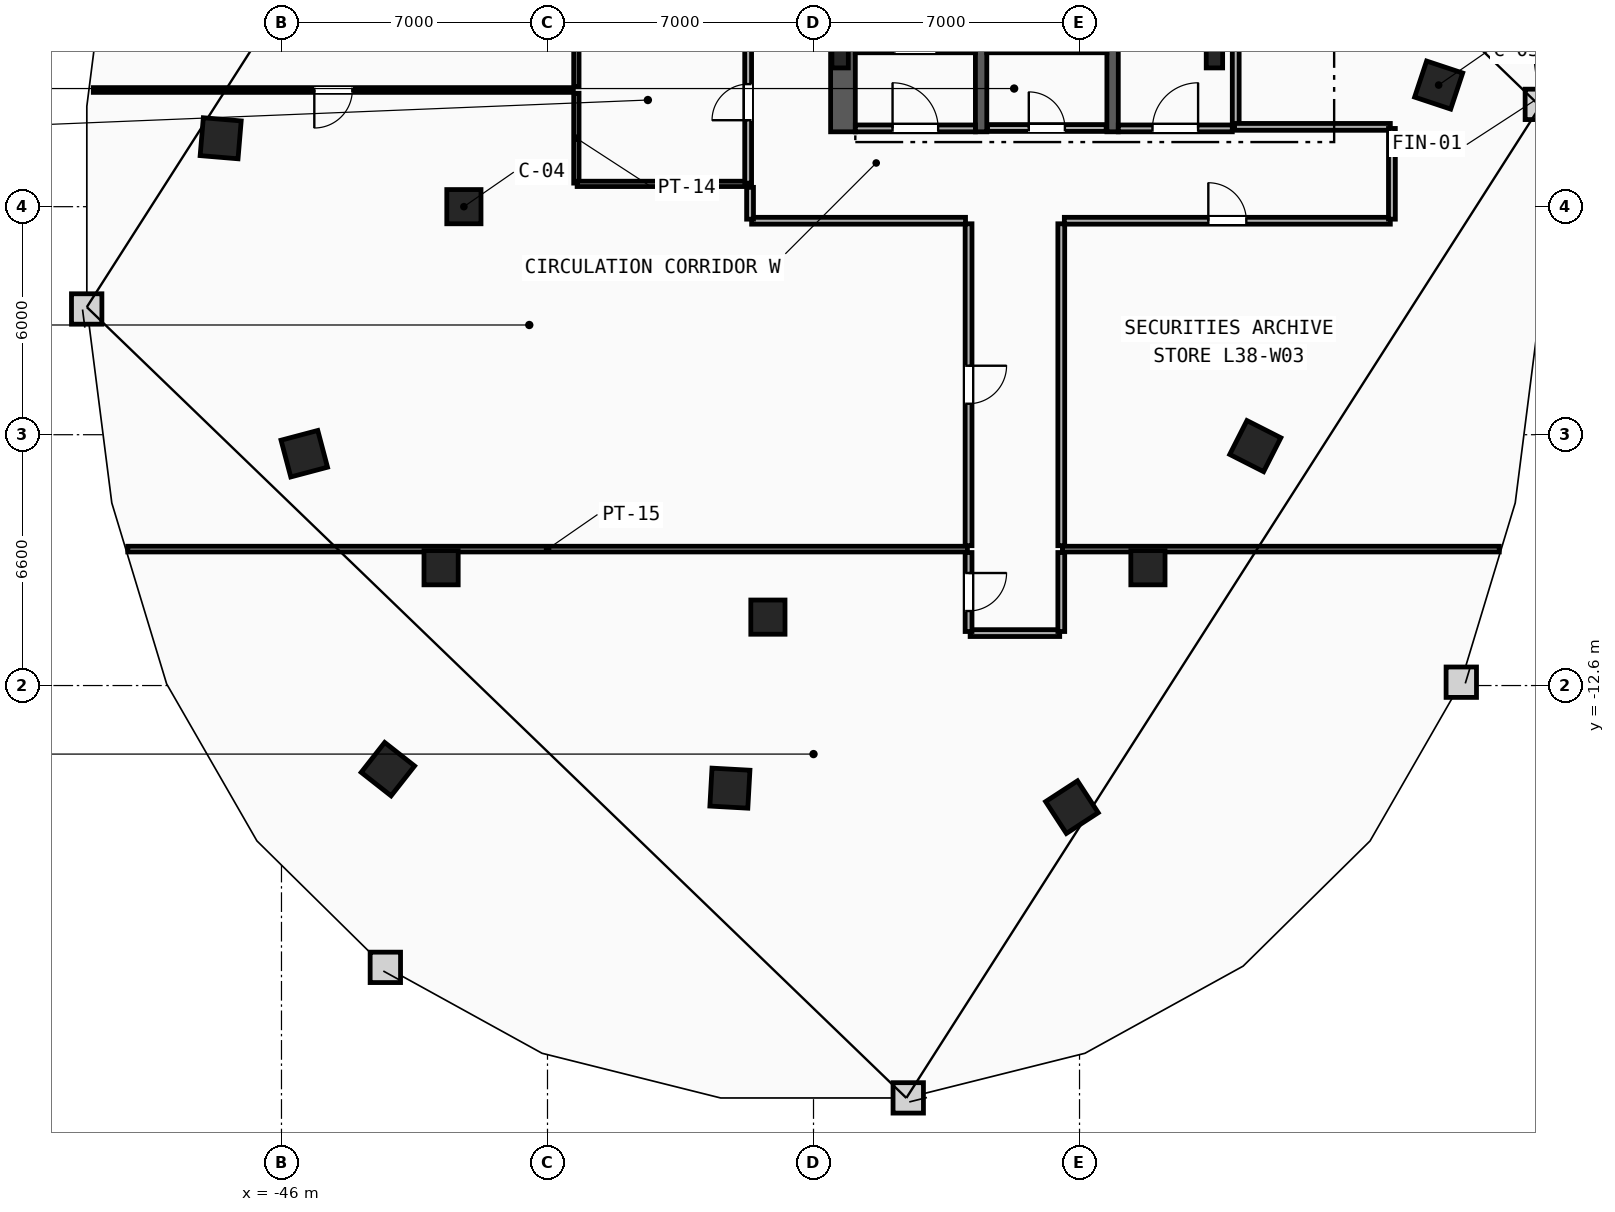
"""IFC4 building model, lengths in metres.
Left out: names, types, materials, properties, quantities, classifications, styles, units other than length and angle.
Written with IfcOpenShell. Run it as: python <this file> out.ifc"""

import sys

from ifc_helpers import new_model, si_unit, direction, frame, frame_2d, origin, origin_2d, place, context, subcontext, project, spatial, rectangle, i_section, extrude, element, fill, save


model = new_model("IFC4")
c1 = context("Model", 3, precision=1e-05, world=origin(), true_north=direction((0.0, 1.0)))
c2 = subcontext(c1, "Body", "Model", "MODEL_VIEW")
j1 = project(units=[si_unit("LENGTHUNIT", "METRE"), si_unit("PLANEANGLEUNIT", "RADIAN")], contexts=[c1])
p1 = place(None, origin())
s1 = spatial("IfcSite", under=j1, at=p1, CompositionType="ELEMENT")
p2 = place(p1, origin())
s2 = spatial("IfcBuilding", under=s1, at=p2, CompositionType="ELEMENT")
p3 = place(p2, frame((0.0, 0.0, 147.6)))
s3 = spatial("IfcBuildingStorey", under=s2, at=p3, CompositionType="ELEMENT", Elevation=147.6)
for number, where, z_axis, x_axis in (
    (1, (-31.3, 3.9, 0.0), (0.0, 0.0, 1.0), (1.0, 0.0, 0.0)),
    (2, (-21.45, 3.9, 0.0), (0.0, 0.0, 1.0), (1.0, 0.0, 0.0)),
):
    element("IfcColumn", number, at=place(p3, frame(where, z_axis=z_axis, x_axis=x_axis)), inside=s3, PredefinedType="COLUMN", context=c2, shape_type="SweptSolid", body=[
        extrude(i_section(OverallWidth=0.432, OverallDepth=0.498, WebThickness=0.056, FlangeThickness=0.089, FilletRadius=0.018, at=origin_2d()), origin(), (0.0, 0.0, 1.0), 3.6),
    ])
for number, where, z_axis, x_axis in (
    (3, (-41.2, 0.0, 0.0), (0.0, 0.0, 1.0), (1.0, 0.0, 0.0)),
    (4, (-41.8, -9.5, 0.0), (0.0, 0.0, 1.0), (1.0, 0.0, 0.0)),
    (5, (-33.2, -10.8, 0.0), (0.0, 0.0, 1.0), (1.0, 0.0, 0.0)),
    (6, (-23.2, -9.5, 0.0), (0.0, 0.0, 1.0), (1.0, 0.0, 0.0)),
):
    element("IfcColumn", number, at=place(p3, frame(where, z_axis=z_axis, x_axis=x_axis)), inside=s3, PredefinedType="COLUMN", context=c2, shape_type="SweptSolid", body=[
        extrude(rectangle(XDim=0.9, YDim=0.9, at=origin_2d()), origin(), (0.0, 0.0, 1.0), 3.6),
    ])
for number, where, z_axis, x_axis in (
    (7, (-15.55, 3.2, 0.0), (0.0, 0.0, 1.0), (0.315, 0.949, 0.0)),
    (8, (-47.6, 1.8, 0.0), (0.0, 0.0, 1.0), (-0.084, -0.997, 0.0)),
    (9, (-45.4, -6.5, 0.0), (0.0, 0.0, 1.0), (0.256, -0.967, 0.0)),
    (10, (-43.2, -14.8, 0.0), (0.0, 0.0, 1.0), (0.786, -0.618, 0.0)),
    (11, (-34.2, -15.3, 0.0), (0.0, 0.0, 1.0), (0.998, -0.055, 0.0)),
    (12, (-25.2, -15.8, 0.0), (0.0, 0.0, 1.0), (0.838, 0.546, 0.0)),
    (13, (-20.375, -6.3, 0.0), (0.0, 0.0, 1.0), (0.453, 0.892, 0.0)),
):
    element("IfcColumn", number, at=place(p3, frame(where, z_axis=z_axis, x_axis=x_axis)), inside=s3, PredefinedType="COLUMN", context=c2, shape_type="SweptSolid", body=[
        extrude(rectangle(XDim=1.0, YDim=1.0, at=origin_2d()), origin(), (0.0, 0.0, 1.0), 3.6),
    ])
p4 = place(p3, frame((-31.225, 1.97, 0.0), z_axis=(0.0, 0.0, 1.0), x_axis=(0.0, 1.0, 0.0)))
e14 = element("IfcWall", 14, at=p4, inside=s3, PredefinedType="SHEAR", context=c2, shape_type="SweptSolid", body=[
    extrude(rectangle(XDim=13.33, YDim=0.65, at=frame_2d((6.665, 0.0))), origin(), (0.0, 0.0, 1.0), 3.36),
])
for number, where, z_axis, x_axis in (
    (15, (-27.59, 1.97, 0.0), (0.0, 0.0, 1.0), (0.0, 1.0, 0.0)),
    (16, (-24.13, 1.97, 0.0), (0.0, 0.0, 1.0), (0.0, 1.0, 0.0)),
):
    element("IfcWall", number, at=place(p3, frame(where, z_axis=z_axis, x_axis=x_axis)), inside=s3, PredefinedType="SHEAR", context=c2, shape_type="SweptSolid", body=[
        extrude(rectangle(XDim=10.68, YDim=0.3, at=frame_2d((5.34, 0.0))), origin(), (0.0, 0.0, 1.0), 3.36),
    ])
p5 = place(p3, frame((-30.9, 4.2, 0.0), z_axis=(0.0, 0.0, 1.0), x_axis=(1.0, 0.0, 0.0)))
e17 = element("IfcWall", 17, at=p5, inside=s3, PredefinedType="SHEAR", context=c2, shape_type="SweptSolid", body=[
    extrude(rectangle(XDim=3.16, YDim=0.3, at=frame_2d((1.58, 0.0))), origin(), (0.0, 0.0, 1.0), 3.36),
])
p6 = place(p5, frame((1.03, 0.0, 0.0)))
e18 = element("IfcOpeningElement", 18, at=p6, cuts=e17, PredefinedType="OPENING", context=c2, shape_type="SweptSolid", body=[
    extrude(rectangle(XDim=1.1, YDim=2.15, at=frame_2d((0.55, 1.075))), frame((0.0, 0.16, 0.0), z_axis=(0.0, -1.0, 0.0), x_axis=(1.0, 0.0, 0.0)), (0.0, 0.0, 1.0), 0.32),
])
p7 = place(p3, frame((-27.44, 4.2, 0.0), z_axis=(0.0, 0.0, 1.0), x_axis=(1.0, 0.0, 0.0)))
e19 = element("IfcWall", 19, at=p7, inside=s3, PredefinedType="SHEAR", context=c2, shape_type="SweptSolid", body=[
    extrude(rectangle(XDim=3.16, YDim=0.3, at=frame_2d((1.58, 0.0))), origin(), (0.0, 0.0, 1.0), 3.36),
])
p8 = place(p3, frame((-20.89, 2.15, 0.0), z_axis=(0.0, 0.0, 1.0), x_axis=(0.0, 1.0, 0.0)))
e20 = element("IfcWall", 20, at=p8, inside=s3, PredefinedType="PARTITIONING", context=c2, shape_type="SweptSolid", body=[
    extrude(rectangle(XDim=5.3, YDim=0.18, at=frame_2d((2.65, 0.0))), origin(), (0.0, 0.0, 1.0), 3.36),
])
p9 = place(p3, frame((-23.98, 2.06, 0.0), z_axis=(0.0, 0.0, 1.0), x_axis=(1.0, 0.0, 0.0)))
e21 = element("IfcWall", 21, at=p9, inside=s3, PredefinedType="PARTITIONING", context=c2, shape_type="SweptSolid", body=[
    extrude(rectangle(XDim=3.0, YDim=0.18, at=frame_2d((1.5, 0.0))), origin(), (0.0, 0.0, 1.0), 3.36),
])
p10 = place(p9, frame((0.9, 0.0, 0.0)))
e22 = element("IfcOpeningElement", 22, at=p10, cuts=e21, PredefinedType="OPENING", context=c2, shape_type="SweptSolid", body=[
    extrude(rectangle(XDim=1.2, YDim=2.15, at=frame_2d((0.6, 1.075))), frame((0.0, 0.1, 0.0), z_axis=(0.0, -1.0, 0.0), x_axis=(1.0, 0.0, 0.0)), (0.0, 0.0, 1.0), 0.2),
])
p11 = place(p3, frame((-30.9, 2.06, 0.0), z_axis=(0.0, 0.0, 1.0), x_axis=(1.0, 0.0, 0.0)))
e23 = element("IfcWall", 23, at=p11, inside=s3, PredefinedType="PARTITIONING", context=c2, shape_type="SweptSolid", body=[
    extrude(rectangle(XDim=3.16, YDim=0.18, at=frame_2d((1.58, 0.0))), origin(), (0.0, 0.0, 1.0), 3.36),
])
p12 = place(p11, frame((0.98, 0.0, 0.0)))
e24 = element("IfcOpeningElement", 24, at=p12, cuts=e23, PredefinedType="OPENING", context=c2, shape_type="SweptSolid", body=[
    extrude(rectangle(XDim=1.2, YDim=2.15, at=frame_2d((0.6, 1.075))), frame((0.0, 0.1, 0.0), z_axis=(0.0, -1.0, 0.0), x_axis=(1.0, 0.0, 0.0)), (0.0, 0.0, 1.0), 0.2),
])
p13 = place(p3, frame((-27.42, 2.07, 0.0), z_axis=(0.0, 0.0, 1.0), x_axis=(1.0, 0.0, 0.0)))
e25 = element("IfcWall", 25, at=p13, inside=s3, PredefinedType="PARTITIONING", context=c2, shape_type="SweptSolid", body=[
    extrude(rectangle(XDim=3.12, YDim=0.18, at=frame_2d((1.56, 0.0))), origin(), (0.0, 0.0, 1.0), 3.36),
])
p14 = place(p13, frame((1.085, 0.0, 0.0)))
e26 = element("IfcOpeningElement", 26, at=p14, cuts=e25, PredefinedType="OPENING", context=c2, shape_type="SweptSolid", body=[
    extrude(rectangle(XDim=0.95, YDim=2.1, at=frame_2d((0.475, 1.05))), frame((0.0, 0.1, 0.0), z_axis=(0.0, -1.0, 0.0), x_axis=(1.0, 0.0, 0.0)), (0.0, 0.0, 1.0), 0.2),
])
p15 = place(p3, frame((-38.24, 0.62, 0.0), z_axis=(0.0, 0.0, 1.0), x_axis=(0.0, 1.0, 0.0)))
e27 = element("IfcWall", 27, at=p15, inside=s3, PredefinedType="PARTITIONING", context=c2, shape_type="SweptSolid", body=[
    extrude(rectangle(XDim=2.365, YDim=0.14, at=frame_2d((1.183, 0.0))), origin(), (0.0, 0.0, 1.0), 3.36),
])
p16 = place(p3, frame((-38.24, 3.155, 0.0), z_axis=(0.0, 0.0, 1.0), x_axis=(0.0, 1.0, 0.0)))
e28 = element("IfcWall", 28, at=p16, inside=s3, PredefinedType="PARTITIONING", context=c2, shape_type="SweptSolid", body=[
    extrude(rectangle(XDim=1.74, YDim=0.14, at=frame_2d((0.87, 0.0))), origin(), (0.0, 0.0, 1.0), 3.36),
])
p17 = place(p3, frame((-38.22, 0.6, 0.0), z_axis=(0.0, 0.0, 1.0), x_axis=(1.0, 0.0, 0.0)))
e29 = element("IfcWall", 29, at=p17, inside=s3, PredefinedType="PARTITIONING", context=c2, shape_type="SweptSolid", body=[
    extrude(rectangle(XDim=4.48, YDim=0.14, at=frame_2d((2.24, 0.0))), origin(), (0.0, 0.0, 1.0), 3.36),
])
p18 = place(p3, frame((-33.72, 0.62, 0.0), z_axis=(0.0, 0.0, 1.0), x_axis=(0.0, 1.0, 0.0)))
e30 = element("IfcWall", 30, at=p18, inside=s3, PredefinedType="PARTITIONING", context=c2, shape_type="SweptSolid", body=[
    extrude(rectangle(XDim=4.26, YDim=0.18, at=frame_2d((2.13, 0.0))), origin(), (0.0, 0.0, 1.0), 3.36),
])
p19 = place(p18, frame((1.655, 0.0, 0.0)))
e31 = element("IfcOpeningElement", 31, at=p19, cuts=e30, PredefinedType="OPENING", context=c2, shape_type="SweptSolid", body=[
    extrude(rectangle(XDim=0.95, YDim=2.1, at=frame_2d((0.475, 1.05))), frame((0.0, 0.1, 0.0), z_axis=(0.0, -1.0, 0.0), x_axis=(1.0, 0.0, 0.0)), (0.0, 0.0, 1.0), 0.2),
])
p20 = place(p3, frame((-50.045, -9.01, 0.0), z_axis=(0.0, 0.0, 1.0), x_axis=(1.0, 0.0, 0.0)))
e32 = element("IfcWall", 32, at=p20, inside=s3, PredefinedType="PARTITIONING", context=c2, shape_type="SweptSolid", body=[
    extrude(rectangle(XDim=22.095, YDim=0.15, at=frame_2d((11.048, 0.0))), origin(), (0.0, 0.0, 1.0), 3.36),
])
p21 = place(p3, frame((-25.45, -9.01, 0.0), z_axis=(0.0, 0.0, 1.0), x_axis=(1.0, 0.0, 0.0)))
e33 = element("IfcWall", 33, at=p21, inside=s3, PredefinedType="PARTITIONING", context=c2, shape_type="SweptSolid", body=[
    extrude(rectangle(XDim=11.495, YDim=0.15, at=frame_2d((5.748, 0.0))), origin(), (0.0, 0.0, 1.0), 3.36),
])
p22 = place(p3, frame((-27.878, -11.22, 0.0), z_axis=(0.0, 0.0, 1.0), x_axis=(1.0, 0.0, 0.0)))
e34 = element("IfcWall", 34, at=p22, inside=s3, PredefinedType="PARTITIONING", context=c2, shape_type="SweptSolid", body=[
    extrude(rectangle(XDim=2.357, YDim=0.18, at=frame_2d((1.178, 0.0))), origin(), (0.0, 0.0, 1.0), 3.36),
])
p23 = place(p3, frame((-27.92, -9.1, 0.0), z_axis=(0.0, 0.0, 1.0), x_axis=(0.0, -1.0, 0.0)))
e35 = element("IfcWall", 35, at=p23, inside=s3, PredefinedType="PARTITIONING", context=c2, shape_type="SweptSolid", body=[
    extrude(rectangle(XDim=2.078, YDim=0.18, at=frame_2d((1.039, 0.0))), origin(), (0.0, 0.0, 1.0), 3.36),
])
p24 = place(p23, frame((0.539, 0.0, 0.0)))
e36 = element("IfcOpeningElement", 36, at=p24, cuts=e35, PredefinedType="OPENING", context=c2, shape_type="SweptSolid", body=[
    extrude(rectangle(XDim=1.0, YDim=2.15, at=frame_2d((0.5, 1.075))), frame((0.0, 0.1, 0.0), z_axis=(0.0, -1.0, 0.0), x_axis=(1.0, 0.0, 0.0)), (0.0, 0.0, 1.0), 0.2),
])
p25 = place(p3, frame((-25.48, -11.178, 0.0), z_axis=(0.0, 0.0, 1.0), x_axis=(0.0, 1.0, 0.0)))
e37 = element("IfcWall", 37, at=p25, inside=s3, PredefinedType="PARTITIONING", context=c2, shape_type="SweptSolid", body=[
    extrude(rectangle(XDim=2.078, YDim=0.18, at=frame_2d((1.039, 0.0))), origin(), (0.0, 0.0, 1.0), 3.36),
])
p26 = place(p3, frame((-27.92, -0.45, 0.0), z_axis=(0.0, 0.0, 1.0), x_axis=(0.0, -1.0, 0.0)))
e38 = element("IfcWall", 38, at=p26, inside=s3, PredefinedType="PARTITIONING", context=c2, shape_type="SweptSolid", body=[
    extrude(rectangle(XDim=8.47, YDim=0.18, at=frame_2d((4.235, 0.0))), origin(), (0.0, 0.0, 1.0), 3.36),
])
p27 = place(p26, frame((3.735, 0.0, 0.0)))
e39 = element("IfcOpeningElement", 39, at=p27, cuts=e38, PredefinedType="OPENING", context=c2, shape_type="SweptSolid", body=[
    extrude(rectangle(XDim=1.0, YDim=2.15, at=frame_2d((0.5, 1.075))), frame((0.0, 0.1, 0.0), z_axis=(0.0, -1.0, 0.0), x_axis=(1.0, 0.0, 0.0)), (0.0, 0.0, 1.0), 0.2),
])
p28 = place(p3, frame((-33.628, -0.37, 0.0), z_axis=(0.0, 0.0, 1.0), x_axis=(1.0, 0.0, 0.0)))
e40 = element("IfcWall", 40, at=p28, inside=s3, PredefinedType="PARTITIONING", context=c2, shape_type="SweptSolid", body=[
    extrude(rectangle(XDim=5.628, YDim=0.18, at=frame_2d((2.814, 0.0))), origin(), (0.0, 0.0, 1.0), 3.36),
])
p29 = place(p3, frame((-33.67, 0.509, 0.0), z_axis=(0.0, 0.0, 1.0), x_axis=(0.0, -1.0, 0.0)))
e41 = element("IfcWall", 41, at=p29, inside=s3, PredefinedType="PARTITIONING", context=c2, shape_type="SweptSolid", body=[
    extrude(rectangle(XDim=0.837, YDim=0.18, at=frame_2d((0.418, 0.0))), origin(), (0.0, 0.0, 1.0), 3.36),
])
p30 = place(p3, frame((-25.4, -0.37, 0.0), z_axis=(0.0, 0.0, 1.0), x_axis=(1.0, 0.0, 0.0)))
e42 = element("IfcWall", 42, at=p30, inside=s3, PredefinedType="PARTITIONING", context=c2, shape_type="SweptSolid", body=[
    extrude(rectangle(XDim=8.578, YDim=0.18, at=frame_2d((4.289, 0.0))), origin(), (0.0, 0.0, 1.0), 3.36),
])
p31 = place(p30, frame((3.789, 0.0, 0.0)))
e43 = element("IfcOpeningElement", 43, at=p31, cuts=e42, PredefinedType="OPENING", context=c2, shape_type="SweptSolid", body=[
    extrude(rectangle(XDim=1.0, YDim=2.15, at=frame_2d((0.5, 1.075))), frame((0.0, 0.1, 0.0), z_axis=(0.0, -1.0, 0.0), x_axis=(1.0, 0.0, 0.0)), (0.0, 0.0, 1.0), 0.2),
])
p32 = place(p3, frame((-25.48, -8.92, 0.0), z_axis=(0.0, 0.0, 1.0), x_axis=(0.0, 1.0, 0.0)))
e44 = element("IfcWall", 44, at=p32, inside=s3, PredefinedType="PARTITIONING", context=c2, shape_type="SweptSolid", body=[
    extrude(rectangle(XDim=8.47, YDim=0.18, at=frame_2d((4.235, 0.0))), origin(), (0.0, 0.0, 1.0), 3.36),
])
p33 = place(p3, frame((-16.822, 2.1, 0.0), z_axis=(0.0, 0.0, 1.0), x_axis=(-1.0, 0.0, 0.0)))
e45 = element("IfcWall", 45, at=p33, inside=s3, PredefinedType="PARTITIONING", context=c2, shape_type="SweptSolid", body=[
    extrude(rectangle(XDim=4.098, YDim=0.18, at=frame_2d((2.049, 0.0))), origin(), (0.0, 0.0, 1.0), 3.36),
])
p34 = place(p3, frame((-16.78, -0.329, 0.0), z_axis=(0.0, 0.0, 1.0), x_axis=(0.0, 1.0, 0.0)))
e46 = element("IfcWall", 46, at=p34, inside=s3, PredefinedType="PARTITIONING", context=c2, shape_type="SweptSolid", body=[
    extrude(rectangle(XDim=2.387, YDim=0.18, at=frame_2d((1.194, 0.0))), origin(), (0.0, 0.0, 1.0), 3.36),
])
p35 = place(p3, frame((-38.32, 3.07, 0.0), z_axis=(0.0, 0.0, 1.0), x_axis=(-1.0, 0.0, 0.0)))
e47 = element("IfcWall", 47, at=p35, inside=s3, PredefinedType="PARTITIONING", context=c2, shape_type="SweptSolid", body=[
    extrude(rectangle(XDim=12.631, YDim=0.125, at=frame_2d((6.316, 0.0))), origin(), (0.0, 0.0, 1.0), 3.36),
])
p36 = place(p35, frame((5.816, 0.0, 0.0)))
e48 = element("IfcOpeningElement", 48, at=p36, cuts=e47, PredefinedType="OPENING", context=c2, shape_type="SweptSolid", body=[
    extrude(rectangle(XDim=1.0, YDim=2.15, at=frame_2d((0.5, 1.075))), frame((0.0, 0.073, 0.0), z_axis=(0.0, -1.0, 0.0), x_axis=(1.0, 0.0, 0.0)), (0.0, 0.0, 1.0), 0.145),
])
p37 = place(p10, origin())
e49 = element("IfcDoor", 49, at=p37, inside=s3, OperationType="SINGLE_SWING_RIGHT", PredefinedType="DOOR", context=c2, shape_type="SweptSolid", body=[
    extrude(rectangle(XDim=1.2, YDim=2.15, at=frame_2d((0.6, 1.075))), frame((0.0, 0.025, 0.0), z_axis=(0.0, -1.0, 0.0), x_axis=(1.0, 0.0, 0.0)), (0.0, 0.0, 1.0), 0.05),
])
fill(e22, e49)
p38 = place(p12, origin())
e50 = element("IfcDoor", 50, at=p38, inside=s3, OperationType="SINGLE_SWING_LEFT", PredefinedType="DOOR", context=c2, shape_type="SweptSolid", body=[
    extrude(rectangle(XDim=1.2, YDim=2.15, at=frame_2d((0.6, 1.075))), frame((0.0, 0.025, 0.0), z_axis=(0.0, -1.0, 0.0), x_axis=(1.0, 0.0, 0.0)), (0.0, 0.0, 1.0), 0.05),
])
fill(e24, e50)
p39 = place(p36, origin())
e51 = element("IfcDoor", 51, at=p39, inside=s3, OperationType="SINGLE_SWING_RIGHT", PredefinedType="DOOR", context=c2, shape_type="SweptSolid", body=[
    extrude(rectangle(XDim=1.0, YDim=2.15, at=frame_2d((0.5, 1.075))), frame((0.0, 0.025, 0.0), z_axis=(0.0, -1.0, 0.0), x_axis=(1.0, 0.0, 0.0)), (0.0, 0.0, 1.0), 0.05),
])
fill(e48, e51)
p40 = place(p31, origin())
e52 = element("IfcDoor", 52, at=p40, inside=s3, OperationType="SINGLE_SWING_LEFT", PredefinedType="DOOR", context=c2, shape_type="SweptSolid", body=[
    extrude(rectangle(XDim=1.0, YDim=2.15, at=frame_2d((0.5, 1.075))), frame((0.0, 0.025, 0.0), z_axis=(0.0, -1.0, 0.0), x_axis=(1.0, 0.0, 0.0)), (0.0, 0.0, 1.0), 0.05),
])
fill(e43, e52)
p41 = place(p27, origin())
e53 = element("IfcDoor", 53, at=p41, inside=s3, OperationType="SINGLE_SWING_LEFT", PredefinedType="DOOR", context=c2, shape_type="SweptSolid", body=[
    extrude(rectangle(XDim=1.0, YDim=2.15, at=frame_2d((0.5, 1.075))), frame((0.0, 0.025, 0.0), z_axis=(0.0, -1.0, 0.0), x_axis=(1.0, 0.0, 0.0)), (0.0, 0.0, 1.0), 0.05),
])
fill(e39, e53)
p42 = place(p19, origin())
e54 = element("IfcDoor", 54, at=p42, inside=s3, OperationType="SINGLE_SWING_LEFT", PredefinedType="DOOR", context=c2, shape_type="SweptSolid", body=[
    extrude(rectangle(XDim=0.95, YDim=2.1, at=frame_2d((0.475, 1.05))), frame((0.0, 0.025, 0.0), z_axis=(0.0, -1.0, 0.0), x_axis=(1.0, 0.0, 0.0)), (0.0, 0.0, 1.0), 0.05),
])
fill(e31, e54)
p43 = place(p14, origin())
e55 = element("IfcDoor", 55, at=p43, inside=s3, OperationType="SINGLE_SWING_LEFT", PredefinedType="DOOR", context=c2, shape_type="SweptSolid", body=[
    extrude(rectangle(XDim=0.95, YDim=2.1, at=frame_2d((0.475, 1.05))), frame((0.0, 0.025, 0.0), z_axis=(0.0, -1.0, 0.0), x_axis=(1.0, 0.0, 0.0)), (0.0, 0.0, 1.0), 0.05),
])
fill(e26, e55)
p44 = place(p24, origin())
e56 = element("IfcDoor", 56, at=p44, inside=s3, OperationType="SINGLE_SWING_LEFT", PredefinedType="DOOR", context=c2, shape_type="SweptSolid", body=[
    extrude(rectangle(XDim=1.0, YDim=2.15, at=frame_2d((0.5, 1.075))), frame((0.0, 0.025, 0.0), z_axis=(0.0, -1.0, 0.0), x_axis=(1.0, 0.0, 0.0)), (0.0, 0.0, 1.0), 0.05),
])
fill(e36, e56)
save(model, sys.argv[1])
